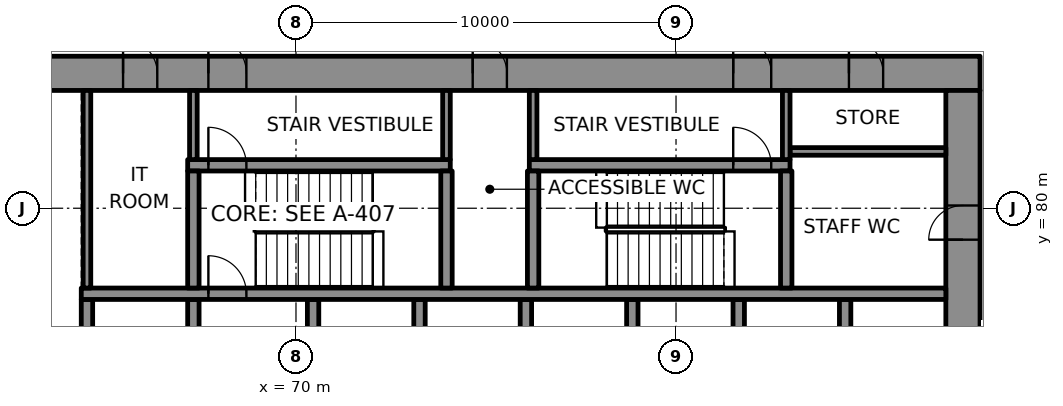
"""IFC4 building model, lengths in metres.
Left out: names, types, materials, properties, quantities, classifications, styles, units other than length and angle.
Written with IfcOpenShell. Run it as: python <this file> out.ifc"""

import sys

from ifc_helpers import new_model, si_unit, direction, frame, frame_2d, origin, place, context, subcontext, project, spatial, rectangle, extrude, element, fill, save


model = new_model("IFC4")
c1 = context("Model", 3, precision=1e-05, world=origin(), true_north=direction((0.0, 1.0)))
c2 = subcontext(c1, "Body", "Model", "MODEL_VIEW")
j1 = project(units=[si_unit("LENGTHUNIT", "METRE"), si_unit("PLANEANGLEUNIT", "RADIAN")], contexts=[c1])
p1 = place(None, origin())
s1 = spatial("IfcSite", under=j1, at=p1, CompositionType="ELEMENT")
p2 = place(p1, origin())
s2 = spatial("IfcBuilding", under=s1, at=p2, CompositionType="ELEMENT")
p3 = place(p2, frame((0.0, 0.0, 103.0)))
s3 = spatial("IfcBuildingStorey", under=s2, at=p3, CompositionType="ELEMENT", Elevation=103.0)
p4 = place(p3, frame((62.0, 83.55, 0.0), z_axis=(0.0, 0.0, 1.0), x_axis=(1.0, 0.0, 0.0)))
e1 = element("IfcWall", 1, at=p4, inside=s3, PredefinedType="SHEAR", context=c2, shape_type="SweptSolid", body=[
    extrude(rectangle(XDim=26.0, YDim=0.9, at=frame_2d((13.0, 0.0))), origin(), (0.0, 0.0, 1.0), 4.0),
])
p5 = place(p4, frame((5.695, 0.0, 0.0)))
e2 = element("IfcOpeningElement", 2, at=p5, cuts=e1, PredefinedType="OPENING", context=c2, shape_type="SweptSolid", body=[
    extrude(rectangle(XDim=1.0, YDim=2.1, at=frame_2d((0.5, 1.05))), frame((0.0, 0.46, 0.0), z_axis=(0.0, -1.0, 0.0), x_axis=(1.0, 0.0, 0.0)), (0.0, 0.0, 1.0), 0.92),
])
p6 = place(p4, frame((19.505, 0.0, 0.0)))
e3 = element("IfcOpeningElement", 3, at=p6, cuts=e1, PredefinedType="OPENING", context=c2, shape_type="SweptSolid", body=[
    extrude(rectangle(XDim=1.0, YDim=2.1, at=frame_2d((0.5, 1.05))), frame((0.0, 0.46, 0.0), z_axis=(0.0, -1.0, 0.0), x_axis=(1.0, 0.0, 0.0)), (0.0, 0.0, 1.0), 0.92),
])
p7 = place(p4, frame((3.45, 0.0, 0.0)))
e4 = element("IfcOpeningElement", 4, at=p7, cuts=e1, PredefinedType="OPENING", context=c2, shape_type="SweptSolid", body=[
    extrude(rectangle(XDim=0.9, YDim=2.1, at=frame_2d((0.45, 1.05))), frame((0.0, 0.46, 0.0), z_axis=(0.0, -1.0, 0.0), x_axis=(1.0, 0.0, 0.0)), (0.0, 0.0, 1.0), 0.92),
])
p8 = place(p4, frame((12.65, 0.0, 0.0)))
e5 = element("IfcOpeningElement", 5, at=p8, cuts=e1, PredefinedType="OPENING", context=c2, shape_type="SweptSolid", body=[
    extrude(rectangle(XDim=0.9, YDim=2.1, at=frame_2d((0.45, 1.05))), frame((0.0, 0.46, 0.0), z_axis=(0.0, -1.0, 0.0), x_axis=(1.0, 0.0, 0.0)), (0.0, 0.0, 1.0), 0.92),
])
p9 = place(p4, frame((22.55, 0.0, 0.0)))
e6 = element("IfcOpeningElement", 6, at=p9, cuts=e1, PredefinedType="OPENING", context=c2, shape_type="SweptSolid", body=[
    extrude(rectangle(XDim=0.9, YDim=2.1, at=frame_2d((0.45, 1.05))), frame((0.0, 0.46, 0.0), z_axis=(0.0, -1.0, 0.0), x_axis=(1.0, 0.0, 0.0)), (0.0, 0.0, 1.0), 0.92),
])
p10 = place(p3, frame((87.55, 66.9, 0.0), z_axis=(0.0, 0.0, 1.0), x_axis=(0.0, 1.0, 0.0)))
e7 = element("IfcWall", 7, at=p10, inside=s3, PredefinedType="SHEAR", context=c2, shape_type="SweptSolid", body=[
    extrude(rectangle(XDim=16.2, YDim=0.9, at=frame_2d((8.1, 0.0))), origin(), (0.0, 0.0, 1.0), 4.0),
])
p11 = place(p10, frame((5.5, 0.0, 0.0)))
e8 = element("IfcOpeningElement", 8, at=p11, cuts=e7, PredefinedType="OPENING", context=c2, shape_type="SweptSolid", body=[
    extrude(rectangle(XDim=1.8, YDim=2.1, at=frame_2d((0.9, 1.05))), frame((0.0, 0.46, 0.0), z_axis=(0.0, -1.0, 0.0), x_axis=(1.0, 0.0, 0.0)), (0.0, 0.0, 1.0), 0.92),
])
p12 = place(p10, frame((12.272, 0.0, 0.0)))
e9 = element("IfcOpeningElement", 9, at=p12, cuts=e7, PredefinedType="OPENING", context=c2, shape_type="SweptSolid", body=[
    extrude(rectangle(XDim=0.9, YDim=2.1, at=frame_2d((0.45, 1.05))), frame((0.0, 0.46, 0.0), z_axis=(0.0, -1.0, 0.0), x_axis=(1.0, 0.0, 0.0)), (0.0, 0.0, 1.0), 0.92),
])
for number, where, z_axis, x_axis in (
    (10, (64.5, 75.0, 0.0), (0.0, 0.0, 1.0), (0.0, 1.0, 0.0)),
    (11, (67.3, 75.0, 0.0), (0.0, 0.0, 1.0), (0.0, 1.0, 0.0)),
):
    element("IfcWall", number, at=place(p3, frame(where, z_axis=z_axis, x_axis=x_axis)), inside=s3, PredefinedType="SHEAR", context=c2, shape_type="SweptSolid", body=[
        extrude(rectangle(XDim=2.6, YDim=0.3, at=frame_2d((1.3, 0.0))), origin(), (0.0, 0.0, 1.0), 4.0),
    ])
p13 = place(p3, frame((70.45, 75.0, 0.0), z_axis=(0.0, 0.0, 1.0), x_axis=(0.0, 1.0, 0.0)))
e12 = element("IfcWall", 12, at=p13, inside=s3, PredefinedType="SHEAR", context=c2, shape_type="SweptSolid", body=[
    extrude(rectangle(XDim=2.6, YDim=0.3, at=frame_2d((1.3, 0.0))), origin(), (0.0, 0.0, 1.0), 4.0),
])
p14 = place(p13, frame((0.15, 0.0, 0.0)))
e13 = element("IfcOpeningElement", 13, at=p14, cuts=e12, PredefinedType="OPENING", context=c2, shape_type="SweptSolid", body=[
    extrude(rectangle(XDim=1.1, YDim=2.1, at=frame_2d((0.55, 1.05))), frame((0.0, 0.16, 0.0), z_axis=(0.0, -1.0, 0.0), x_axis=(1.0, 0.0, 0.0)), (0.0, 0.0, 1.0), 0.32),
])
for number, where, z_axis, x_axis in (
    (14, (73.25, 75.0, 0.0), (0.0, 0.0, 1.0), (0.0, 1.0, 0.0)),
    (15, (76.05, 75.0, 0.0), (0.0, 0.0, 1.0), (0.0, 1.0, 0.0)),
    (16, (78.85, 75.0, 0.0), (0.0, 0.0, 1.0), (0.0, 1.0, 0.0)),
    (17, (81.65, 75.0, 0.0), (0.0, 0.0, 1.0), (0.0, 1.0, 0.0)),
    (18, (84.45, 75.0, 0.0), (0.0, 0.0, 1.0), (0.0, 1.0, 0.0)),
):
    element("IfcWall", number, at=place(p3, frame(where, z_axis=z_axis, x_axis=x_axis)), inside=s3, PredefinedType="SHEAR", context=c2, shape_type="SweptSolid", body=[
        extrude(rectangle(XDim=2.6, YDim=0.3, at=frame_2d((1.3, 0.0))), origin(), (0.0, 0.0, 1.0), 4.0),
    ])
p15 = place(p3, frame((64.35, 77.75, 0.0), z_axis=(0.0, 0.0, 1.0), x_axis=(1.0, 0.0, 0.0)))
e19 = element("IfcWall", 19, at=p15, inside=s3, PredefinedType="SHEAR", context=c2, shape_type="SweptSolid", body=[
    extrude(rectangle(XDim=22.75, YDim=0.3, at=frame_2d((11.375, 0.0))), origin(), (0.0, 0.0, 1.0), 4.0),
])
p16 = place(p15, frame((3.345, 0.0, 0.0)))
e20 = element("IfcOpeningElement", 20, at=p16, cuts=e19, PredefinedType="OPENING", context=c2, shape_type="SweptSolid", body=[
    extrude(rectangle(XDim=1.0, YDim=2.1, at=frame_2d((0.5, 1.05))), frame((0.0, 0.16, 0.0), z_axis=(0.0, -1.0, 0.0), x_axis=(1.0, 0.0, 0.0)), (0.0, 0.0, 1.0), 0.32),
])
p17 = place(p3, frame((67.15, 81.13, 0.0), z_axis=(0.0, 0.0, 1.0), x_axis=(1.0, 0.0, 0.0)))
e21 = element("IfcWall", 21, at=p17, inside=s3, PredefinedType="SHEAR", context=c2, shape_type="SweptSolid", body=[
    extrude(rectangle(XDim=6.91, YDim=0.3, at=frame_2d((3.455, 0.0))), origin(), (0.0, 0.0, 1.0), 4.0),
])
p18 = place(p17, frame((0.545, 0.0, 0.0)))
e22 = element("IfcOpeningElement", 22, at=p18, cuts=e21, PredefinedType="OPENING", context=c2, shape_type="SweptSolid", body=[
    extrude(rectangle(XDim=1.0, YDim=2.1, at=frame_2d((0.5, 1.05))), frame((0.0, 0.16, 0.0), z_axis=(0.0, -1.0, 0.0), x_axis=(1.0, 0.0, 0.0)), (0.0, 0.0, 1.0), 0.32),
])
p19 = place(p3, frame((76.14, 81.13, 0.0), z_axis=(0.0, 0.0, 1.0), x_axis=(1.0, 0.0, 0.0)))
e23 = element("IfcWall", 23, at=p19, inside=s3, PredefinedType="SHEAR", context=c2, shape_type="SweptSolid", body=[
    extrude(rectangle(XDim=6.86, YDim=0.3, at=frame_2d((3.43, 0.0))), origin(), (0.0, 0.0, 1.0), 4.0),
])
p20 = place(p19, frame((5.365, 0.0, 0.0)))
e24 = element("IfcOpeningElement", 24, at=p20, cuts=e23, PredefinedType="OPENING", context=c2, shape_type="SweptSolid", body=[
    extrude(rectangle(XDim=1.0, YDim=2.1, at=frame_2d((0.5, 1.05))), frame((0.0, 0.16, 0.0), z_axis=(0.0, -1.0, 0.0), x_axis=(1.0, 0.0, 0.0)), (0.0, 0.0, 1.0), 0.32),
])
for number, where, z_axis, x_axis in (
    (25, (67.3, 77.9, 0.0), (0.0, 0.0, 1.0), (0.0, 1.0, 0.0)),
    (26, (73.96, 77.9, 0.0), (0.0, 0.0, 1.0), (0.0, 1.0, 0.0)),
    (27, (76.24, 77.9, 0.0), (0.0, 0.0, 1.0), (0.0, 1.0, 0.0)),
    (28, (82.9, 77.9, 0.0), (0.0, 0.0, 1.0), (0.0, 1.0, 0.0)),
):
    element("IfcWall", number, at=place(p3, frame(where, z_axis=z_axis, x_axis=x_axis)), inside=s3, PredefinedType="SHEAR", context=c2, shape_type="SweptSolid", body=[
        extrude(rectangle(XDim=3.08, YDim=0.3, at=frame_2d((1.54, 0.0))), origin(), (0.0, 0.0, 1.0), 4.0),
    ])
p21 = place(p3, frame((83.0, 81.495, 0.0), z_axis=(0.0, 0.0, 1.0), x_axis=(1.0, 0.0, 0.0)))
e29 = element("IfcWall", 29, at=p21, inside=s3, PredefinedType="PARTITIONING", context=c2, shape_type="SweptSolid", body=[
    extrude(rectangle(XDim=4.1, YDim=0.2, at=frame_2d((2.05, 0.0))), origin(), (0.0, 0.0, 1.0), 4.0),
])
p22 = place(p3, frame((64.5, 77.9, 0.0), z_axis=(0.0, 0.0, 1.0), x_axis=(0.0, 1.0, 0.0)))
e30 = element("IfcWall", 30, at=p22, inside=s3, PredefinedType="PARTITIONING", context=c2, shape_type="SweptSolid", body=[
    extrude(rectangle(XDim=5.2, YDim=0.2, at=frame_2d((2.6, 0.0))), origin(), (0.0, 0.0, 1.0), 4.0),
])
for number, where, z_axis, x_axis in (
    (31, (67.3, 81.28, 0.0), (0.0, 0.0, 1.0), (0.0, 1.0, 0.0)),
    (32, (73.96, 81.28, 0.0), (0.0, 0.0, 1.0), (0.0, 1.0, 0.0)),
    (33, (76.24, 81.28, 0.0), (0.0, 0.0, 1.0), (0.0, 1.0, 0.0)),
    (34, (82.9, 81.28, 0.0), (0.0, 0.0, 1.0), (0.0, 1.0, 0.0)),
):
    element("IfcWall", number, at=place(p3, frame(where, z_axis=z_axis, x_axis=x_axis)), inside=s3, PredefinedType="PARTITIONING", context=c2, shape_type="SweptSolid", body=[
        extrude(rectangle(XDim=1.82, YDim=0.2, at=frame_2d((0.91, 0.0))), origin(), (0.0, 0.0, 1.0), 4.0),
    ])
p23 = place(p16, origin())
e35 = element("IfcDoor", 35, at=p23, inside=s3, OperationType="SINGLE_SWING_LEFT", PredefinedType="DOOR", context=c2, shape_type="SweptSolid", body=[
    extrude(rectangle(XDim=1.0, YDim=2.1, at=frame_2d((0.5, 1.05))), frame((0.0, 0.025, 0.0), z_axis=(0.0, -1.0, 0.0), x_axis=(1.0, 0.0, 0.0)), (0.0, 0.0, 1.0), 0.05),
])
fill(e20, e35)
p24 = place(p18, origin())
e36 = element("IfcDoor", 36, at=p24, inside=s3, OperationType="SINGLE_SWING_RIGHT", PredefinedType="DOOR", context=c2, shape_type="SweptSolid", body=[
    extrude(rectangle(XDim=1.0, YDim=2.1, at=frame_2d((0.5, 1.05))), frame((0.0, 0.025, 0.0), z_axis=(0.0, -1.0, 0.0), x_axis=(1.0, 0.0, 0.0)), (0.0, 0.0, 1.0), 0.05),
])
fill(e22, e36)
p25 = place(p5, origin())
e37 = element("IfcDoor", 37, at=p25, inside=s3, OperationType="SINGLE_SWING_LEFT", PredefinedType="DOOR", context=c2, shape_type="SweptSolid", body=[
    extrude(rectangle(XDim=1.0, YDim=2.1, at=frame_2d((0.5, 1.05))), frame((0.0, 0.17, 0.0), z_axis=(0.0, -1.0, 0.0), x_axis=(1.0, 0.0, 0.0)), (0.0, 0.0, 1.0), 0.34),
])
fill(e2, e37)
p26 = place(p20, origin())
e38 = element("IfcDoor", 38, at=p26, inside=s3, OperationType="SINGLE_SWING_RIGHT", PredefinedType="DOOR", context=c2, shape_type="SweptSolid", body=[
    extrude(rectangle(XDim=1.0, YDim=2.1, at=frame_2d((0.5, 1.05))), frame((0.0, 0.025, 0.0), z_axis=(0.0, -1.0, 0.0), x_axis=(1.0, 0.0, 0.0)), (0.0, 0.0, 1.0), 0.05),
])
fill(e24, e38)
p27 = place(p6, origin())
e39 = element("IfcDoor", 39, at=p27, inside=s3, OperationType="SINGLE_SWING_LEFT", PredefinedType="DOOR", context=c2, shape_type="SweptSolid", body=[
    extrude(rectangle(XDim=1.0, YDim=2.1, at=frame_2d((0.5, 1.05))), frame((0.0, 0.17, 0.0), z_axis=(0.0, -1.0, 0.0), x_axis=(1.0, 0.0, 0.0)), (0.0, 0.0, 1.0), 0.34),
])
fill(e3, e39)
p28 = place(p7, origin())
e40 = element("IfcDoor", 40, at=p28, inside=s3, OperationType="SINGLE_SWING_RIGHT", PredefinedType="DOOR", context=c2, shape_type="SweptSolid", body=[
    extrude(rectangle(XDim=0.9, YDim=2.1, at=frame_2d((0.45, 1.05))), frame((0.0, 0.17, 0.0), z_axis=(0.0, -1.0, 0.0), x_axis=(1.0, 0.0, 0.0)), (0.0, 0.0, 1.0), 0.34),
])
fill(e4, e40)
p29 = place(p8, origin())
e41 = element("IfcDoor", 41, at=p29, inside=s3, OperationType="SINGLE_SWING_LEFT", PredefinedType="DOOR", context=c2, shape_type="SweptSolid", body=[
    extrude(rectangle(XDim=0.9, YDim=2.1, at=frame_2d((0.45, 1.05))), frame((0.0, 0.17, 0.0), z_axis=(0.0, -1.0, 0.0), x_axis=(1.0, 0.0, 0.0)), (0.0, 0.0, 1.0), 0.34),
])
fill(e5, e41)
p30 = place(p12, origin())
e42 = element("IfcDoor", 42, at=p30, inside=s3, OperationType="SINGLE_SWING_RIGHT", PredefinedType="DOOR", context=c2, shape_type="SweptSolid", body=[
    extrude(rectangle(XDim=0.9, YDim=2.1, at=frame_2d((0.45, 1.05))), frame((0.0, 0.17, 0.0), z_axis=(0.0, -1.0, 0.0), x_axis=(1.0, 0.0, 0.0)), (0.0, 0.0, 1.0), 0.34),
])
fill(e9, e42)
p31 = place(p9, origin())
e43 = element("IfcDoor", 43, at=p31, inside=s3, OperationType="SINGLE_SWING_LEFT", PredefinedType="DOOR", context=c2, shape_type="SweptSolid", body=[
    extrude(rectangle(XDim=0.9, YDim=2.1, at=frame_2d((0.45, 1.05))), frame((0.0, 0.17, 0.0), z_axis=(0.0, -1.0, 0.0), x_axis=(1.0, 0.0, 0.0)), (0.0, 0.0, 1.0), 0.34),
])
fill(e6, e43)
save(model, sys.argv[1])
